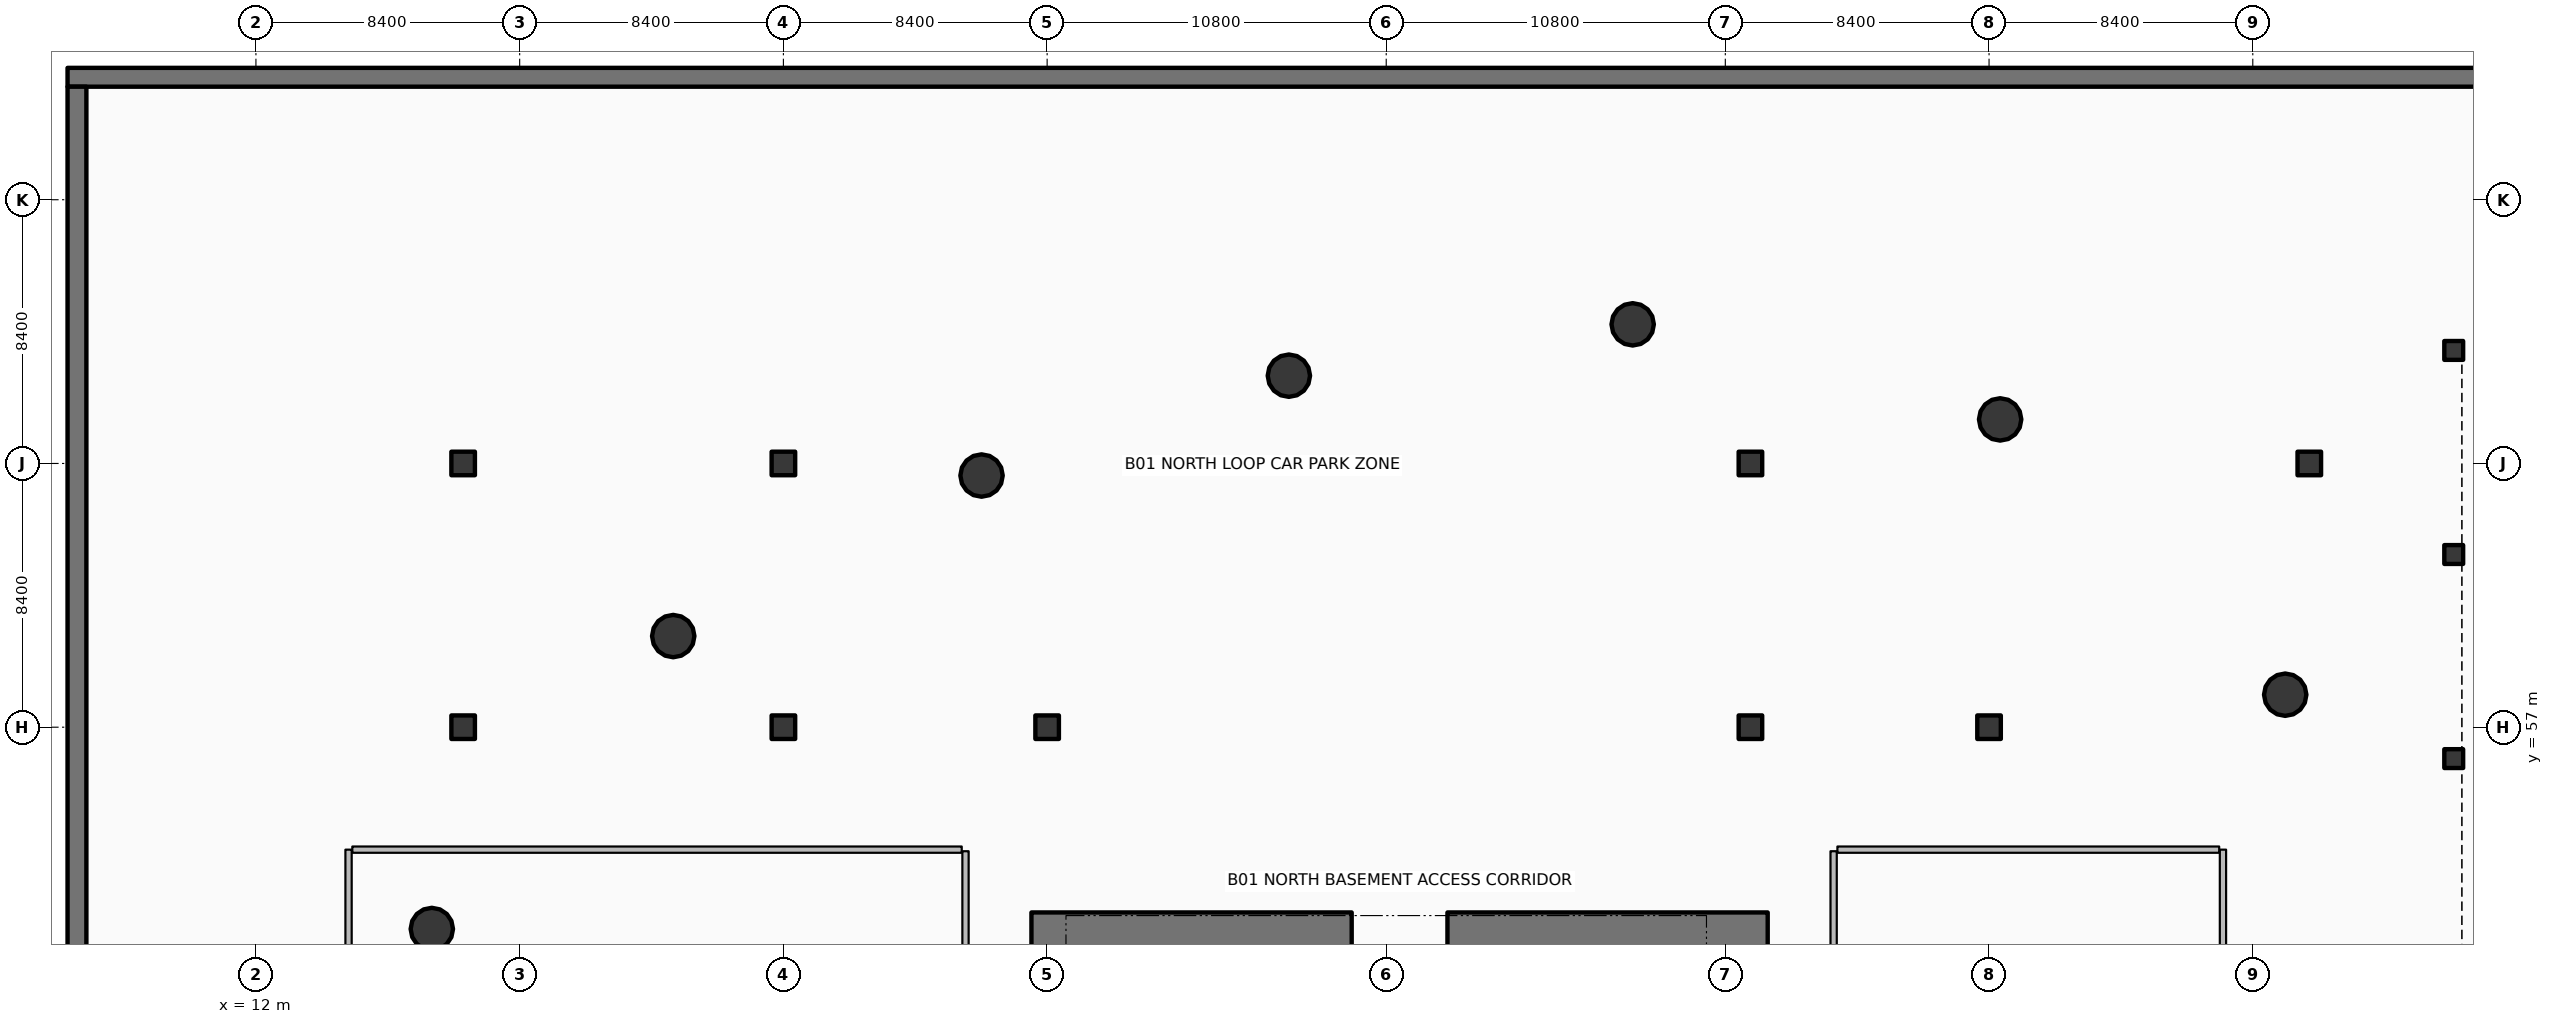
"""IFC4 building model, lengths in metres.
Left out: names, types, materials, properties, quantities, classifications, styles, units other than length and angle.
Written with IfcOpenShell. Run it as: python <this file> out.ifc"""

import sys

from ifc_helpers import new_model, si_unit, direction, frame, frame_2d, origin, origin_2d, place, context, subcontext, project, spatial, rectangle, circle, extrude, element, save


model = new_model("IFC4")
c1 = context("Model", 3, precision=1e-05, world=origin(), true_north=direction((0.0, 1.0)))
c2 = subcontext(c1, "Body", "Model", "MODEL_VIEW")
j1 = project(units=[si_unit("LENGTHUNIT", "METRE"), si_unit("PLANEANGLEUNIT", "RADIAN")], contexts=[c1])
p1 = place(None, origin())
s1 = spatial("IfcSite", under=j1, at=p1, CompositionType="ELEMENT")
p2 = place(p1, origin())
s2 = spatial("IfcBuilding", under=s1, at=p2, CompositionType="ELEMENT")
p3 = place(p2, frame((0.0, 0.0, -3.8)))
s3 = spatial("IfcBuildingStorey", under=s2, at=p3, CompositionType="ELEMENT", Elevation=-3.8)
p4 = place(p3, frame((6.0, 77.7, 0.0), z_axis=(0.0, 0.0, 1.0), x_axis=(1.0, 0.0, 0.0)))
e1 = element("IfcWall", 1, at=p4, inside=s3, PredefinedType="USERDEFINED", context=c2, shape_type="SweptSolid", body=[
    extrude(rectangle(XDim=84.0, YDim=0.6, at=frame_2d((42.0, 0.0))), origin(), (0.0, 0.0, 1.0), 3.8),
])
p5 = place(p3, frame((6.3, 6.6, 0.0), z_axis=(0.0, 0.0, 1.0), x_axis=(0.0, 1.0, 0.0)))
e2 = element("IfcWall", 2, at=p5, inside=s3, PredefinedType="USERDEFINED", context=c2, shape_type="SweptSolid", body=[
    extrude(rectangle(XDim=70.8, YDim=0.6, at=frame_2d((35.4, 0.0))), origin(), (0.0, 0.0, 1.0), 3.8),
])
for number, where, z_axis, x_axis in (
    (3, (18.6, 57.0, 0.0), (0.0, 0.0, 1.0), (1.0, 0.0, 0.0)),
    (4, (18.6, 65.4, 0.0), (0.0, 0.0, 1.0), (1.0, 0.0, 0.0)),
    (5, (28.8, 57.0, 0.0), (0.0, 0.0, 1.0), (1.0, 0.0, 0.0)),
    (6, (28.8, 65.4, 0.0), (0.0, 0.0, 1.0), (1.0, 0.0, 0.0)),
    (7, (37.2, 57.0, 0.0), (0.0, 0.0, 1.0), (1.0, 0.0, 0.0)),
    (8, (59.6, 57.0, 0.0), (0.0, 0.0, 1.0), (1.0, 0.0, 0.0)),
    (9, (59.6, 65.4, 0.0), (0.0, 0.0, 1.0), (1.0, 0.0, 0.0)),
    (10, (67.2, 57.0, 0.0), (0.0, 0.0, 1.0), (1.0, 0.0, 0.0)),
    (11, (77.4, 65.4, 0.0), (0.0, 0.0, 1.0), (1.0, 0.0, 0.0)),
):
    element("IfcColumn", number, at=place(p3, frame(where, z_axis=z_axis, x_axis=x_axis)), inside=s3, PredefinedType="COLUMN", context=c2, shape_type="SweptSolid", body=[
        extrude(rectangle(XDim=0.75, YDim=0.75, at=origin_2d()), origin(), (0.0, 0.0, 1.0), 3.48),
    ])
for number, where, z_axis, x_axis in (
    (12, (82.0, 56.0, 0.0), (0.0, 0.0, 1.0), (1.0, 0.0, 0.0)),
    (13, (82.0, 62.5, 0.0), (0.0, 0.0, 1.0), (1.0, 0.0, 0.0)),
    (14, (82.0, 69.0, 0.0), (0.0, 0.0, 1.0), (1.0, 0.0, 0.0)),
):
    element("IfcColumn", number, at=place(p3, frame(where, z_axis=z_axis, x_axis=x_axis)), inside=s3, PredefinedType="COLUMN", context=c2, shape_type="SweptSolid", body=[
        extrude(rectangle(XDim=0.6, YDim=0.6, at=origin_2d()), origin(), (0.0, 0.0, 1.0), 3.48),
    ])
for number, where, z_axis, x_axis in (
    (15, (36.7, 50.55, 0.0), (0.0, 0.0, 1.0), (1.0, 0.0, 0.0)),
    (16, (49.95, 50.55, 0.0), (0.0, 0.0, 1.0), (1.0, 0.0, 0.0)),
):
    element("IfcWall", number, at=place(p3, frame(where, z_axis=z_axis, x_axis=x_axis)), inside=s3, PredefinedType="SHEAR", context=c2, shape_type="SweptSolid", body=[
        extrude(rectangle(XDim=10.2, YDim=1.1, at=frame_2d((5.1, 0.0))), origin(), (0.0, 0.0, 1.0), 3.8),
    ])
for number, where, z_axis, x_axis in (
    (17, (76.633, 58.035, 0.0), (0.0, 0.0, 1.0), (1.0, 0.0, 0.0)),
    (18, (67.553, 66.803, 0.0), (0.0, 0.0, 1.0), (1.0, 0.0, 0.0)),
    (19, (55.849, 69.831, 0.0), (0.0, 0.0, 1.0), (1.0, 0.0, 0.0)),
    (20, (44.899, 68.196, 0.0), (0.0, 0.0, 1.0), (1.0, 0.0, 0.0)),
    (21, (35.111, 65.016, 0.0), (0.0, 0.0, 1.0), (1.0, 0.0, 0.0)),
    (22, (25.291, 59.902, 0.0), (0.0, 0.0, 1.0), (1.0, 0.0, 0.0)),
    (23, (17.602, 50.573, 0.0), (0.0, 0.0, 1.0), (1.0, 0.0, 0.0)),
):
    element("IfcColumn", number, at=place(p3, frame(where, z_axis=z_axis, x_axis=x_axis)), inside=s3, PredefinedType="COLUMN", context=c2, shape_type="SweptSolid", body=[
        extrude(circle(Radius=0.675, at=origin_2d()), origin(), (0.0, 0.0, 1.0), 3.48),
    ])
p6 = place(p3, frame((14.95, 30.9, 0.0), z_axis=(0.0, 0.0, 1.0), x_axis=(0.0, 1.0, 0.0)))
e24 = element("IfcWall", 24, at=p6, inside=s3, PredefinedType="PARTITIONING", context=c2, shape_type="SweptSolid", body=[
    extrude(rectangle(XDim=22.2, YDim=0.2, at=frame_2d((11.1, 0.0))), origin(), (0.0, 0.0, 1.0), 2.92),
])
p7 = place(p3, frame((15.07, 53.1, 0.0), z_axis=(0.0, 0.0, 1.0), x_axis=(1.0, 0.0, 0.0)))
e25 = element("IfcWall", 25, at=p7, inside=s3, PredefinedType="PARTITIONING", context=c2, shape_type="SweptSolid", body=[
    extrude(rectangle(XDim=19.41, YDim=0.2, at=frame_2d((9.705, 0.0))), origin(), (0.0, 0.0, 1.0), 2.771),
])
p8 = place(p3, frame((34.6, 30.95, 0.0), z_axis=(0.0, 0.0, 1.0), x_axis=(0.0, 1.0, 0.0)))
e26 = element("IfcWall", 26, at=p8, inside=s3, PredefinedType="PARTITIONING", context=c2, shape_type="SweptSolid", body=[
    extrude(rectangle(XDim=22.1, YDim=0.2, at=frame_2d((11.05, 0.0))), origin(), (0.0, 0.0, 1.0), 2.771),
])
p9 = place(p8, frame((10.525, 0.0, 0.0)))
e27 = element("IfcOpeningElement", 27, at=p9, cuts=e26, PredefinedType="OPENING", context=c2, shape_type="SweptSolid", body=[
    extrude(rectangle(XDim=1.05, YDim=2.1, at=frame_2d((0.525, 1.05))), frame((0.0, 0.11, 0.0), z_axis=(0.0, -1.0, 0.0), x_axis=(1.0, 0.0, 0.0)), (0.0, 0.0, 1.0), 0.22),
])
p10 = place(p3, frame((74.65, 30.9, 0.0), z_axis=(0.0, 0.0, 1.0), x_axis=(0.0, 1.0, 0.0)))
e28 = element("IfcWall", 28, at=p10, inside=s3, PredefinedType="PARTITIONING", context=c2, shape_type="SweptSolid", body=[
    extrude(rectangle(XDim=22.2, YDim=0.2, at=frame_2d((11.1, 0.0))), origin(), (0.0, 0.0, 1.0), 2.771),
])
p11 = place(p3, frame((62.37, 53.1, 0.0), z_axis=(0.0, 0.0, 1.0), x_axis=(1.0, 0.0, 0.0)))
e29 = element("IfcWall", 29, at=p11, inside=s3, PredefinedType="PARTITIONING", context=c2, shape_type="SweptSolid", body=[
    extrude(rectangle(XDim=12.16, YDim=0.2, at=frame_2d((6.08, 0.0))), origin(), (0.0, 0.0, 1.0), 2.771),
])
p12 = place(p3, frame((62.25, 30.95, 0.0), z_axis=(0.0, 0.0, 1.0), x_axis=(0.0, 1.0, 0.0)))
e30 = element("IfcWall", 30, at=p12, inside=s3, PredefinedType="PARTITIONING", context=c2, shape_type="SweptSolid", body=[
    extrude(rectangle(XDim=22.1, YDim=0.2, at=frame_2d((11.05, 0.0))), origin(), (0.0, 0.0, 1.0), 2.771),
])
p13 = place(p12, frame((10.525, 0.0, 0.0)))
e31 = element("IfcOpeningElement", 31, at=p13, cuts=e30, PredefinedType="OPENING", context=c2, shape_type="SweptSolid", body=[
    extrude(rectangle(XDim=1.05, YDim=2.1, at=frame_2d((0.525, 1.05))), frame((0.0, 0.11, 0.0), z_axis=(0.0, -1.0, 0.0), x_axis=(1.0, 0.0, 0.0)), (0.0, 0.0, 1.0), 0.22),
])
save(model, sys.argv[1])
